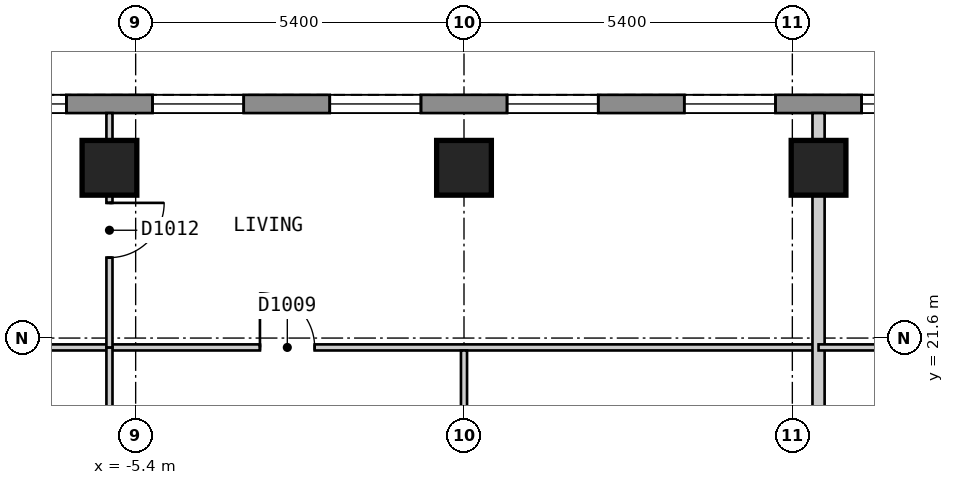
"""IFC4 building model, lengths in metres.
Left out: names, types, materials, properties, quantities, classifications, styles, units other than length and angle.
Written with IfcOpenShell. Run it as: python <this file> out.ifc"""

import sys

from ifc_helpers import new_model, si_unit, direction, frame, frame_2d, origin, origin_2d, place, context, subcontext, project, spatial, polyline, rectangle, outline, extrude, element, fill, save


model = new_model("IFC4")
c1 = context("Model", 3, precision=1e-05, world=origin(), true_north=direction((0.0, 1.0)))
c2 = subcontext(c1, "Body", "Model", "MODEL_VIEW")
j1 = project(units=[si_unit("LENGTHUNIT", "METRE"), si_unit("PLANEANGLEUNIT", "RADIAN")], contexts=[c1])
p1 = place(None, origin())
s1 = spatial("IfcSite", under=j1, at=p1, CompositionType="ELEMENT")
p2 = place(p1, origin())
s2 = spatial("IfcBuilding", under=s1, at=p2, CompositionType="ELEMENT")
p3 = place(p2, frame((0.0, 0.0, 120.6)))
s3 = spatial("IfcBuildingStorey", under=s2, at=p3, CompositionType="ELEMENT", Elevation=120.6)
for number, where, z_axis, x_axis in (
    (1, (5.831, 24.4, 0.0), (0.0, 0.0, 1.0), (-1.0, 0.0, 0.0)),
    (2, (0.0, 24.4, 0.0), (0.0, 0.0, 1.0), (-1.0, 0.0, 0.0)),
    (3, (-5.831, 24.4, 0.0), (0.0, 0.0, 1.0), (-1.0, 0.0, 0.0)),
):
    element("IfcColumn", number, at=place(p3, frame(where, z_axis=z_axis, x_axis=x_axis)), inside=s3, PredefinedType="COLUMN", context=c2, shape_type="SweptSolid", body=[
        extrude(rectangle(XDim=0.9, YDim=0.9, at=origin_2d()), origin(), (0.0, 0.0, 1.0), 3.0),
    ])
p4 = place(p3, frame((12.355, 25.45, 0.0), z_axis=(0.0, 0.0, 1.0), x_axis=(-1.0, 0.0, 0.0)))
e4 = element("IfcWall", 4, at=p4, inside=s3, PredefinedType="SOLIDWALL", context=c2, shape_type="SweptSolid", body=[
    extrude(outline(polyline([(0.0, -0.15), (24.71, -0.15), (24.63, 0.15), (0.08, 0.15), (0.0, -0.15)])), origin(), (0.0, 0.0, 1.0), 2.7),
])
p5 = place(p4, frame((1.401, 0.0, 0.15)))
e5 = element("IfcOpeningElement", 5, at=p5, cuts=e4, PredefinedType="OPENING", context=c2, shape_type="SweptSolid", body=[
    extrude(rectangle(XDim=1.5, YDim=2.1, at=frame_2d((0.75, 1.05))), frame((0.0, 0.16, 0.0), z_axis=(0.0, -1.0, 0.0), x_axis=(1.0, 0.0, 0.0)), (0.0, 0.0, 1.0), 0.32),
])
p6 = place(p4, frame((4.316, 0.0, 0.15)))
e6 = element("IfcOpeningElement", 6, at=p6, cuts=e4, PredefinedType="OPENING", context=c2, shape_type="SweptSolid", body=[
    extrude(rectangle(XDim=1.5, YDim=2.1, at=frame_2d((0.75, 1.05))), frame((0.0, 0.16, 0.0), z_axis=(0.0, -1.0, 0.0), x_axis=(1.0, 0.0, 0.0)), (0.0, 0.0, 1.0), 0.32),
])
p7 = place(p4, frame((7.232, 0.0, 0.15)))
e7 = element("IfcOpeningElement", 7, at=p7, cuts=e4, PredefinedType="OPENING", context=c2, shape_type="SweptSolid", body=[
    extrude(rectangle(XDim=1.5, YDim=2.1, at=frame_2d((0.75, 1.05))), frame((0.0, 0.16, 0.0), z_axis=(0.0, -1.0, 0.0), x_axis=(1.0, 0.0, 0.0)), (0.0, 0.0, 1.0), 0.32),
])
p8 = place(p4, frame((10.147, 0.0, 0.15)))
e8 = element("IfcOpeningElement", 8, at=p8, cuts=e4, PredefinedType="OPENING", context=c2, shape_type="SweptSolid", body=[
    extrude(rectangle(XDim=1.5, YDim=2.1, at=frame_2d((0.75, 1.05))), frame((0.0, 0.16, 0.0), z_axis=(0.0, -1.0, 0.0), x_axis=(1.0, 0.0, 0.0)), (0.0, 0.0, 1.0), 0.32),
])
p9 = place(p4, frame((13.063, 0.0, 0.15)))
e9 = element("IfcOpeningElement", 9, at=p9, cuts=e4, PredefinedType="OPENING", context=c2, shape_type="SweptSolid", body=[
    extrude(rectangle(XDim=1.5, YDim=2.1, at=frame_2d((0.75, 1.05))), frame((0.0, 0.16, 0.0), z_axis=(0.0, -1.0, 0.0), x_axis=(1.0, 0.0, 0.0)), (0.0, 0.0, 1.0), 0.32),
])
p10 = place(p4, frame((15.978, 0.0, 0.15)))
e10 = element("IfcOpeningElement", 10, at=p10, cuts=e4, PredefinedType="OPENING", context=c2, shape_type="SweptSolid", body=[
    extrude(rectangle(XDim=1.5, YDim=2.1, at=frame_2d((0.75, 1.05))), frame((0.0, 0.16, 0.0), z_axis=(0.0, -1.0, 0.0), x_axis=(1.0, 0.0, 0.0)), (0.0, 0.0, 1.0), 0.32),
])
p11 = place(p4, frame((18.894, 0.0, 0.15)))
e11 = element("IfcOpeningElement", 11, at=p11, cuts=e4, PredefinedType="OPENING", context=c2, shape_type="SweptSolid", body=[
    extrude(rectangle(XDim=1.5, YDim=2.1, at=frame_2d((0.75, 1.05))), frame((0.0, 0.16, 0.0), z_axis=(0.0, -1.0, 0.0), x_axis=(1.0, 0.0, 0.0)), (0.0, 0.0, 1.0), 0.32),
])
p12 = place(p4, frame((21.809, 0.0, 0.15)))
e12 = element("IfcOpeningElement", 12, at=p12, cuts=e4, PredefinedType="OPENING", context=c2, shape_type="SweptSolid", body=[
    extrude(rectangle(XDim=1.5, YDim=2.1, at=frame_2d((0.75, 1.05))), frame((0.0, 0.16, 0.0), z_axis=(0.0, -1.0, 0.0), x_axis=(1.0, 0.0, 0.0)), (0.0, 0.0, 1.0), 0.32),
])
p13 = place(p3, frame((-7.706, 21.446, 0.0), z_axis=(0.0, 0.0, 1.0), x_axis=(1.0, 0.0, 0.0)))
e13 = element("IfcWall", 13, at=p13, inside=s3, PredefinedType="PARTITIONING", context=c2, shape_type="SweptSolid", body=[
    extrude(rectangle(XDim=13.537, YDim=0.1, at=frame_2d((6.769, 0.0))), origin(), (0.0, 0.0, 1.0), 2.7),
])
p14 = place(p13, frame((4.35, 0.0, 0.0)))
e14 = element("IfcOpeningElement", 14, at=p14, cuts=e13, PredefinedType="OPENING", context=c2, shape_type="SweptSolid", body=[
    extrude(rectangle(XDim=0.9, YDim=2.1, at=frame_2d((0.45, 1.05))), frame((0.0, 0.06, 0.0), z_axis=(0.0, -1.0, 0.0), x_axis=(1.0, 0.0, 0.0)), (0.0, 0.0, 1.0), 0.12),
])
p15 = place(p3, frame((0.0, 17.5, 0.0), z_axis=(0.0, 0.0, 1.0), x_axis=(0.0, 1.0, 0.0)))
e15 = element("IfcWall", 15, at=p15, inside=s3, PredefinedType="PARTITIONING", context=c2, shape_type="SweptSolid", body=[
    extrude(rectangle(XDim=3.896, YDim=0.1, at=frame_2d((1.948, 0.0))), origin(), (0.0, 0.0, 1.0), 2.7),
])
p16 = place(p15, frame((1.523, 0.0, 0.0)))
e16 = element("IfcOpeningElement", 16, at=p16, cuts=e15, PredefinedType="OPENING", context=c2, shape_type="SweptSolid", body=[
    extrude(rectangle(XDim=0.8, YDim=2.1, at=frame_2d((0.4, 1.05))), frame((0.0, 0.06, 0.0), z_axis=(0.0, -1.0, 0.0), x_axis=(1.0, 0.0, 0.0)), (0.0, 0.0, 1.0), 0.12),
])
p17 = place(p3, frame((-5.831, 16.9, 0.0), z_axis=(0.0, 0.0, 1.0), x_axis=(0.0, 1.0, 0.0)))
e17 = element("IfcWall", 17, at=p17, inside=s3, PredefinedType="PARTITIONING", context=c2, shape_type="SweptSolid", body=[
    extrude(rectangle(XDim=4.546, YDim=0.1, at=frame_2d((2.273, 0.0))), origin(), (0.0, 0.0, 1.0), 2.7),
])
p18 = place(p17, frame((1.723, 0.0, 0.0)))
e18 = element("IfcOpeningElement", 18, at=p18, cuts=e17, PredefinedType="OPENING", context=c2, shape_type="SweptSolid", body=[
    extrude(rectangle(XDim=0.9, YDim=2.1, at=frame_2d((0.45, 1.05))), frame((0.0, 0.06, 0.0), z_axis=(0.0, -1.0, 0.0), x_axis=(1.0, 0.0, 0.0)), (0.0, 0.0, 1.0), 0.12),
])
p19 = place(p3, frame((5.831, 16.9, 0.0), z_axis=(0.0, 0.0, 1.0), x_axis=(0.0, 1.0, 0.0)))
e19 = element("IfcWall", 19, at=p19, inside=s3, PredefinedType="PARTITIONING", context=c2, shape_type="SweptSolid", body=[
    extrude(rectangle(XDim=8.4, YDim=0.2, at=frame_2d((4.2, 0.0))), origin(), (0.0, 0.0, 1.0), 2.7),
])
p20 = place(p3, frame((-5.831, 21.446, 0.0), z_axis=(0.0, 0.0, 1.0), x_axis=(0.0, 1.0, 0.0)))
e20 = element("IfcWall", 20, at=p20, inside=s3, PredefinedType="PARTITIONING", context=c2, shape_type="SweptSolid", body=[
    extrude(rectangle(XDim=3.854, YDim=0.1, at=frame_2d((1.927, 0.0))), origin(), (0.0, 0.0, 1.0), 2.7),
])
p21 = place(p20, frame((1.477, 0.0, 0.0)))
e21 = element("IfcOpeningElement", 21, at=p21, cuts=e20, PredefinedType="OPENING", context=c2, shape_type="SweptSolid", body=[
    extrude(rectangle(XDim=0.9, YDim=2.1, at=frame_2d((0.45, 1.05))), frame((0.0, 0.06, 0.0), z_axis=(0.0, -1.0, 0.0), x_axis=(1.0, 0.0, 0.0)), (0.0, 0.0, 1.0), 0.12),
])
p22 = place(p3, frame((5.831, 21.446, 0.0), z_axis=(0.0, 0.0, 1.0), x_axis=(1.0, 0.0, 0.0)))
e22 = element("IfcWall", 22, at=p22, inside=s3, PredefinedType="PARTITIONING", context=c2, shape_type="SweptSolid", body=[
    extrude(rectangle(XDim=1.932, YDim=0.1, at=frame_2d((0.966, 0.0))), origin(), (0.0, 0.0, 1.0), 2.7),
])
p23 = place(p6, origin())
e23 = element("IfcWindow", 23, at=p23, inside=s3, PartitioningType="SINGLE_PANEL", PredefinedType="WINDOW", context=c2, shape_type="SweptSolid", body=[
    extrude(rectangle(XDim=1.5, YDim=2.1, at=frame_2d((0.75, 1.05))), frame((0.0, 0.03, 0.0), z_axis=(0.0, -1.0, 0.0), x_axis=(1.0, 0.0, 0.0)), (0.0, 0.0, 1.0), 0.06),
])
fill(e6, e23)
p24 = place(p7, origin())
e24 = element("IfcWindow", 24, at=p24, inside=s3, PartitioningType="SINGLE_PANEL", PredefinedType="WINDOW", context=c2, shape_type="SweptSolid", body=[
    extrude(rectangle(XDim=1.5, YDim=2.1, at=frame_2d((0.75, 1.05))), frame((0.0, 0.03, 0.0), z_axis=(0.0, -1.0, 0.0), x_axis=(1.0, 0.0, 0.0)), (0.0, 0.0, 1.0), 0.06),
])
fill(e7, e24)
p25 = place(p8, origin())
e25 = element("IfcWindow", 25, at=p25, inside=s3, PartitioningType="SINGLE_PANEL", PredefinedType="WINDOW", context=c2, shape_type="SweptSolid", body=[
    extrude(rectangle(XDim=1.5, YDim=2.1, at=frame_2d((0.75, 1.05))), frame((0.0, 0.03, 0.0), z_axis=(0.0, -1.0, 0.0), x_axis=(1.0, 0.0, 0.0)), (0.0, 0.0, 1.0), 0.06),
])
fill(e8, e25)
p26 = place(p9, origin())
e26 = element("IfcWindow", 26, at=p26, inside=s3, PartitioningType="SINGLE_PANEL", PredefinedType="WINDOW", context=c2, shape_type="SweptSolid", body=[
    extrude(rectangle(XDim=1.5, YDim=2.1, at=frame_2d((0.75, 1.05))), frame((0.0, 0.03, 0.0), z_axis=(0.0, -1.0, 0.0), x_axis=(1.0, 0.0, 0.0)), (0.0, 0.0, 1.0), 0.06),
])
fill(e9, e26)
p27 = place(p10, origin())
e27 = element("IfcWindow", 27, at=p27, inside=s3, PartitioningType="SINGLE_PANEL", PredefinedType="WINDOW", context=c2, shape_type="SweptSolid", body=[
    extrude(rectangle(XDim=1.5, YDim=2.1, at=frame_2d((0.75, 1.05))), frame((0.0, 0.03, 0.0), z_axis=(0.0, -1.0, 0.0), x_axis=(1.0, 0.0, 0.0)), (0.0, 0.0, 1.0), 0.06),
])
fill(e10, e27)
p28 = place(p11, origin())
e28 = element("IfcWindow", 28, at=p28, inside=s3, PartitioningType="SINGLE_PANEL", PredefinedType="WINDOW", context=c2, shape_type="SweptSolid", body=[
    extrude(rectangle(XDim=1.5, YDim=2.1, at=frame_2d((0.75, 1.05))), frame((0.0, 0.03, 0.0), z_axis=(0.0, -1.0, 0.0), x_axis=(1.0, 0.0, 0.0)), (0.0, 0.0, 1.0), 0.06),
])
fill(e11, e28)
p29 = place(p14, origin())
e29 = element("IfcDoor", 29, at=p29, inside=s3, OperationType="SINGLE_SWING_LEFT", PredefinedType="DOOR", context=c2, shape_type="SweptSolid", body=[
    extrude(rectangle(XDim=0.9, YDim=2.1, at=frame_2d((0.45, 1.05))), frame((0.0, 0.025, 0.0), z_axis=(0.0, -1.0, 0.0), x_axis=(1.0, 0.0, 0.0)), (0.0, 0.0, 1.0), 0.05),
])
fill(e14, e29)
p30 = place(p21, origin())
e30 = element("IfcDoor", 30, at=p30, inside=s3, OperationType="SINGLE_SWING_RIGHT", PredefinedType="DOOR", context=c2, shape_type="SweptSolid", body=[
    extrude(rectangle(XDim=0.9, YDim=2.1, at=frame_2d((0.45, 1.05))), frame((0.0, 0.025, 0.0), z_axis=(0.0, -1.0, 0.0), x_axis=(1.0, 0.0, 0.0)), (0.0, 0.0, 1.0), 0.05),
])
fill(e21, e30)
save(model, sys.argv[1])
